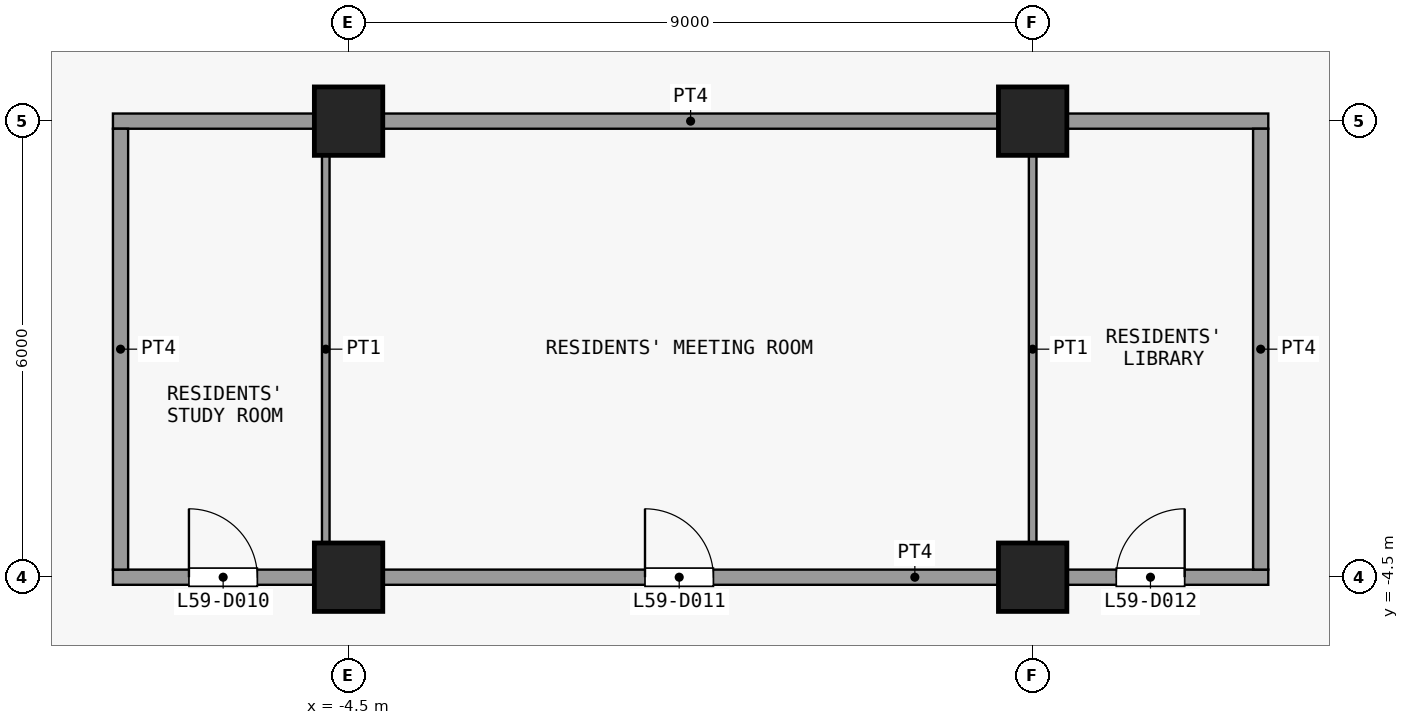
"""IFC4 building model, lengths in metres.
Left out: names, types, materials, properties, quantities, classifications, styles, units other than length and angle.
Written with IfcOpenShell. Run it as: python <this file> out.ifc"""

import sys

from ifc_helpers import new_model, si_unit, direction, frame, frame_2d, origin, origin_2d, place, context, subcontext, project, spatial, rectangle, extrude, element, fill, save


model = new_model("IFC4")
c1 = context("Model", 3, precision=1e-05, world=origin(), true_north=direction((0.0, 1.0)))
c2 = subcontext(c1, "Body", "Model", "MODEL_VIEW")
j1 = project(units=[si_unit("LENGTHUNIT", "METRE"), si_unit("PLANEANGLEUNIT", "RADIAN")], contexts=[c1])
p1 = place(None, origin())
s1 = spatial("IfcSite", under=j1, at=p1, CompositionType="ELEMENT")
p2 = place(p1, origin())
s2 = spatial("IfcBuilding", under=s1, at=p2, CompositionType="ELEMENT")
p3 = place(p2, frame((0.0, 0.0, 233.9)))
s3 = spatial("IfcBuildingStorey", under=s2, at=p3, CompositionType="ELEMENT", Elevation=233.9)
for number, where, z_axis, x_axis in (
    (1, (-4.5, -4.5, 0.0), (0.0, 0.0, 1.0), (1.0, 0.0, 0.0)),
    (2, (-4.5, 1.5, 0.0), (0.0, 0.0, 1.0), (1.0, 0.0, 0.0)),
    (3, (4.5, -4.5, 0.0), (0.0, 0.0, 1.0), (1.0, 0.0, 0.0)),
    (4, (4.5, 1.5, 0.0), (0.0, 0.0, 1.0), (1.0, 0.0, 0.0)),
):
    element("IfcColumn", number, at=place(p3, frame(where, z_axis=z_axis, x_axis=x_axis)), inside=s3, PredefinedType="COLUMN", context=c2, shape_type="SweptSolid", body=[
        extrude(rectangle(XDim=0.9, YDim=0.9, at=origin_2d()), origin(), (0.0, 0.0, 1.0), 3.6),
    ])
p4 = place(p3, frame((-7.6, -4.5, 0.0), z_axis=(0.0, 0.0, 1.0), x_axis=(1.0, 0.0, 0.0)))
e5 = element("IfcWall", 5, at=p4, inside=s3, PredefinedType="PARTITIONING", context=c2, shape_type="SweptSolid", body=[
    extrude(rectangle(XDim=15.2, YDim=0.2, at=frame_2d((7.6, 0.0))), origin(), (0.0, 0.0, 1.0), 3.3),
])
p5 = place(p4, frame((1.0, 0.0, 0.0)))
e6 = element("IfcOpeningElement", 6, at=p5, cuts=e5, PredefinedType="OPENING", context=c2, shape_type="SweptSolid", body=[
    extrude(rectangle(XDim=0.9, YDim=2.1, at=frame_2d((0.45, 1.05))), frame((0.0, 0.11, 0.0), z_axis=(0.0, -1.0, 0.0), x_axis=(1.0, 0.0, 0.0)), (0.0, 0.0, 1.0), 0.22),
])
p6 = place(p4, frame((7.0, 0.0, 0.0)))
e7 = element("IfcOpeningElement", 7, at=p6, cuts=e5, PredefinedType="OPENING", context=c2, shape_type="SweptSolid", body=[
    extrude(rectangle(XDim=0.9, YDim=2.1, at=frame_2d((0.45, 1.05))), frame((0.0, 0.11, 0.0), z_axis=(0.0, -1.0, 0.0), x_axis=(1.0, 0.0, 0.0)), (0.0, 0.0, 1.0), 0.22),
])
p7 = place(p4, frame((13.2, 0.0, 0.0)))
e8 = element("IfcOpeningElement", 8, at=p7, cuts=e5, PredefinedType="OPENING", context=c2, shape_type="SweptSolid", body=[
    extrude(rectangle(XDim=0.9, YDim=2.1, at=frame_2d((0.45, 1.05))), frame((0.0, 0.11, 0.0), z_axis=(0.0, -1.0, 0.0), x_axis=(1.0, 0.0, 0.0)), (0.0, 0.0, 1.0), 0.22),
])
p8 = place(p3, frame((-7.6, 1.5, 0.0), z_axis=(0.0, 0.0, 1.0), x_axis=(1.0, 0.0, 0.0)))
e9 = element("IfcWall", 9, at=p8, inside=s3, PredefinedType="PARTITIONING", context=c2, shape_type="SweptSolid", body=[
    extrude(rectangle(XDim=15.2, YDim=0.2, at=frame_2d((7.6, 0.0))), origin(), (0.0, 0.0, 1.0), 3.3),
])
p9 = place(p3, frame((-7.5, -4.4, 0.0), z_axis=(0.0, 0.0, 1.0), x_axis=(0.0, 1.0, 0.0)))
e10 = element("IfcWall", 10, at=p9, inside=s3, PredefinedType="PARTITIONING", context=c2, shape_type="SweptSolid", body=[
    extrude(rectangle(XDim=5.8, YDim=0.2, at=frame_2d((2.9, 0.0))), origin(), (0.0, 0.0, 1.0), 3.3),
])
for number, where, z_axis, x_axis in (
    (11, (-4.8, -4.4, 0.0), (0.0, 0.0, 1.0), (0.0, 1.0, 0.0)),
    (12, (4.5, -4.4, 0.0), (0.0, 0.0, 1.0), (0.0, 1.0, 0.0)),
):
    element("IfcWall", number, at=place(p3, frame(where, z_axis=z_axis, x_axis=x_axis)), inside=s3, PredefinedType="PARTITIONING", context=c2, shape_type="SweptSolid", body=[
        extrude(rectangle(XDim=5.8, YDim=0.1, at=frame_2d((2.9, 0.0))), origin(), (0.0, 0.0, 1.0), 3.3),
    ])
p10 = place(p3, frame((7.5, -4.4, 0.0), z_axis=(0.0, 0.0, 1.0), x_axis=(0.0, 1.0, 0.0)))
e13 = element("IfcWall", 13, at=p10, inside=s3, PredefinedType="PARTITIONING", context=c2, shape_type="SweptSolid", body=[
    extrude(rectangle(XDim=5.8, YDim=0.2, at=frame_2d((2.9, 0.0))), origin(), (0.0, 0.0, 1.0), 3.3),
])
p11 = place(p5, origin())
e14 = element("IfcDoor", 14, at=p11, inside=s3, OperationType="SINGLE_SWING_RIGHT", PredefinedType="DOOR", context=c2, shape_type="SweptSolid", body=[
    extrude(rectangle(XDim=0.9, YDim=2.1, at=frame_2d((0.45, 1.05))), frame((0.0, 0.025, 0.0), z_axis=(0.0, -1.0, 0.0), x_axis=(1.0, 0.0, 0.0)), (0.0, 0.0, 1.0), 0.05),
])
fill(e6, e14)
p12 = place(p6, origin())
e15 = element("IfcDoor", 15, at=p12, inside=s3, OperationType="SINGLE_SWING_RIGHT", PredefinedType="DOOR", context=c2, shape_type="SweptSolid", body=[
    extrude(rectangle(XDim=0.9, YDim=2.1, at=frame_2d((0.45, 1.05))), frame((0.0, 0.025, 0.0), z_axis=(0.0, -1.0, 0.0), x_axis=(1.0, 0.0, 0.0)), (0.0, 0.0, 1.0), 0.05),
])
fill(e7, e15)
p13 = place(p7, origin())
e16 = element("IfcDoor", 16, at=p13, inside=s3, OperationType="SINGLE_SWING_LEFT", PredefinedType="DOOR", context=c2, shape_type="SweptSolid", body=[
    extrude(rectangle(XDim=0.9, YDim=2.1, at=frame_2d((0.45, 1.05))), frame((0.0, 0.025, 0.0), z_axis=(0.0, -1.0, 0.0), x_axis=(1.0, 0.0, 0.0)), (0.0, 0.0, 1.0), 0.05),
])
fill(e8, e16)
save(model, sys.argv[1])
